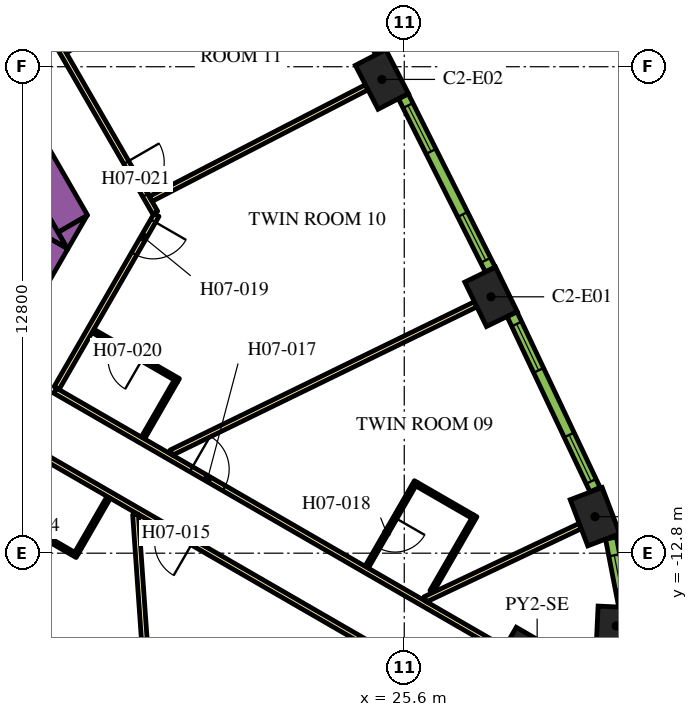
"""IFC4 building model, lengths in metres.
Left out: names, types, materials, properties, quantities, classifications, styles, units other than length and angle.
Written with IfcOpenShell. Run it as: python <this file> out.ifc"""

import sys

from ifc_helpers import new_model, si_unit, direction, frame, frame_2d, origin, origin_2d, place, context, subcontext, project, spatial, polyline, rectangle, outline, extrude, element, fill, save


model = new_model("IFC4")
c1 = context("Model", 3, precision=1e-05, world=origin(), true_north=direction((0.0, 1.0)))
c2 = subcontext(c1, "Body", "Model", "MODEL_VIEW")
j1 = project(units=[si_unit("LENGTHUNIT", "METRE"), si_unit("PLANEANGLEUNIT", "RADIAN")], contexts=[c1])
p1 = place(None, origin())
s1 = spatial("IfcSite", under=j1, at=p1, CompositionType="ELEMENT")
p2 = place(p1, origin())
s2 = spatial("IfcBuilding", under=s1, at=p2, CompositionType="ELEMENT")
p3 = place(p2, frame((0.0, 0.0, 99.3)))
s3 = spatial("IfcBuildingStorey", under=s2, at=p3, CompositionType="ELEMENT", Elevation=99.3)
p4 = place(p3, frame((29.097, -16.799, 0.0), z_axis=(0.0, 0.0, 1.0), x_axis=(0.866025403784, -0.5, 0.0)))
e1 = element("IfcColumn", 1, at=p4, inside=s3, PredefinedType="COLUMN", context=c2, shape_type="SweptSolid", body=[
    extrude(rectangle(XDim=3.0, YDim=3.0, at=origin_2d()), origin(), (0.0, 0.0, 1.0), 3.9),
])
p5 = place(p3, frame((31.177, -14.714, 0.0), z_axis=(0.0, 0.0, 1.0), x_axis=(0.046756026083, 0.998906338965, 0.0)))
e2 = element("IfcColumn", 2, at=p5, inside=s3, PredefinedType="COLUMN", context=c2, shape_type="SweptSolid", body=[
    extrude(rectangle(XDim=1.0, YDim=1.0, at=origin_2d()), origin(), (0.0, 0.0, 1.0), 3.9),
])
for number, where, z_axis, x_axis in (
    (3, (30.619, -11.839, 0.0), (0.0, 0.0, 1.0), (-0.355, 0.935, 0.0)),
    (4, (27.883, -6.054, 0.0), (0.0, 0.0, 1.0), (-0.438, 0.899, 0.0)),
    (5, (25.012, -0.334, 0.0), (0.0, 0.0, 1.0), (-0.459, 0.888, 0.0)),
):
    element("IfcColumn", number, at=place(p3, frame(where, z_axis=z_axis, x_axis=x_axis)), inside=s3, PredefinedType="COLUMN", context=c2, shape_type="SweptSolid", body=[
        extrude(rectangle(XDim=1.3, YDim=0.9, at=origin_2d()), origin(), (0.0, 0.0, 1.0), 3.9),
    ])
p6 = place(p3, frame((6.776, 13.364, 0.0), z_axis=(0.0, 0.0, 1.0), x_axis=(0.500004177138, -0.8660229921, 0.0)))
e6 = element("IfcWall", 6, at=p6, inside=s3, PredefinedType="SOLIDWALL", context=c2, shape_type="SweptSolid", body=[
    extrude(rectangle(XDim=20.204, YDim=0.9, at=frame_2d((10.102, 0.0))), origin(), (0.0, 0.0, 1.0), 3.9),
])
p7 = place(p3, origin())
e7 = element("IfcWall", 7, at=p7, inside=s3, PredefinedType="SOLIDWALL", context=c2, shape_type="SweptSolid", body=[
    extrude(outline(polyline([(16.743, -4.8), (16.489, -4.36), (17.251, -3.92), (16.743, -4.8)])), origin(), (0.0, 0.0, 1.0), 3.9),
])
p8 = place(p3, frame((11.695, -12.644, 0.0), z_axis=(0.0, 0.0, 1.0), x_axis=(0.500010229568, 0.86601949766, 0.0)))
e8 = element("IfcWall", 8, at=p8, inside=s3, PredefinedType="SOLIDWALL", context=c2, shape_type="SweptSolid", body=[
    extrude(rectangle(XDim=9.326, YDim=0.9, at=frame_2d((4.663, 0.0))), origin(), (0.0, 0.0, 1.0), 3.9),
])
e9 = element("IfcWall", 9, at=p7, inside=s3, PredefinedType="SOLIDWALL", context=c2, shape_type="SweptSolid", body=[
    extrude(outline(polyline([(16.223, -3.9), (16.732, -4.78), (15.969, -4.34), (16.223, -3.9)])), origin(), (0.0, 0.0, 1.0), 3.9),
])
p9 = place(p3, frame((16.412, -8.523, 0.0), z_axis=(0.0, 0.0, 1.0), x_axis=(0.866025629663, -0.499999608766, 0.0)))
e10 = element("IfcWall", 10, at=p9, inside=s3, PredefinedType="PARTITIONING", context=c2, shape_type="SweptSolid", body=[
    extrude(rectangle(XDim=13.624, YDim=0.15, at=frame_2d((6.812, 0.0))), origin(), (0.0, 0.0, 1.0), 2.75),
])
p10 = place(p9, frame((4.134, 0.0, 0.0)))
e11 = element("IfcOpeningElement", 11, at=p10, cuts=e10, PredefinedType="OPENING", context=c2, shape_type="SweptSolid", body=[
    extrude(rectangle(XDim=1.0, YDim=2.1, at=frame_2d((0.5, 1.05))), frame((0.0, 0.085, 0.0), z_axis=(0.0, -1.0, 0.0), x_axis=(1.0, 0.0, 0.0)), (0.0, 0.0, 1.0), 0.17),
])
p11 = place(p3, frame((19.081, -3.9, 0.0), z_axis=(0.0, 0.0, 1.0), x_axis=(-0.499974327079, -0.866040225545, 0.0)))
e12 = element("IfcWall", 12, at=p11, inside=s3, PredefinedType="PARTITIONING", context=c2, shape_type="SweptSolid", body=[
    extrude(rectangle(XDim=5.258, YDim=0.15, at=frame_2d((2.629, 0.0))), origin(), (0.0, 0.0, 1.0), 2.75),
])
p12 = place(p11, frame((0.18, 0.0, 0.0)))
e13 = element("IfcOpeningElement", 13, at=p12, cuts=e12, PredefinedType="OPENING", context=c2, shape_type="SweptSolid", body=[
    extrude(rectangle(XDim=1.0, YDim=2.1, at=frame_2d((0.5, 1.05))), frame((0.0, 0.085, 0.0), z_axis=(0.0, -1.0, 0.0), x_axis=(1.0, 0.0, 0.0)), (0.0, 0.0, 1.0), 0.17),
])
p13 = place(p3, frame((6.163, 18.475, 0.0), z_axis=(0.0, 0.0, 1.0), x_axis=(0.500001317485, -0.866024643133, 0.0)))
e14 = element("IfcWall", 14, at=p13, inside=s3, PredefinedType="PARTITIONING", context=c2, shape_type="SweptSolid", body=[
    extrude(rectangle(XDim=25.767, YDim=0.15, at=frame_2d((12.883, 0.0))), origin(), (0.0, 0.0, 1.0), 2.75),
])
p14 = place(p13, frame((24.241, 0.0, 0.0)))
e15 = element("IfcOpeningElement", 15, at=p14, cuts=e14, PredefinedType="OPENING", context=c2, shape_type="SweptSolid", body=[
    extrude(rectangle(XDim=1.0, YDim=2.1, at=frame_2d((0.5, 1.05))), frame((0.0, 0.085, 0.0), z_axis=(0.0, -1.0, 0.0), x_axis=(1.0, 0.0, 0.0)), (0.0, 0.0, 1.0), 0.17),
])
p15 = place(p13, frame((13.144, 0.0, 0.0)))
e16 = element("IfcOpeningElement", 16, at=p15, cuts=e14, PredefinedType="OPENING", context=c2, shape_type="SweptSolid", body=[
    extrude(rectangle(XDim=1.0, YDim=2.1, at=frame_2d((0.5, 1.05))), frame((0.0, 0.085, 0.0), z_axis=(0.0, -1.0, 0.0), x_axis=(1.0, 0.0, 0.0)), (0.0, 0.0, 1.0), 0.17),
])
p16 = place(p13, frame((11.592, 0.0, 0.0)))
e17 = element("IfcOpeningElement", 17, at=p16, cuts=e14, PredefinedType="OPENING", context=c2, shape_type="SweptSolid", body=[
    extrude(rectangle(XDim=1.1, YDim=2.1, at=frame_2d((0.55, 1.05))), frame((0.0, 0.085, 0.0), z_axis=(0.0, -1.0, 0.0), x_axis=(1.0, 0.0, 0.0)), (0.0, 0.0, 1.0), 0.17),
])
p17 = place(p13, frame((4.674, 0.0, 0.0)))
e18 = element("IfcOpeningElement", 18, at=p17, cuts=e14, PredefinedType="OPENING", context=c2, shape_type="SweptSolid", body=[
    extrude(rectangle(XDim=0.9, YDim=2.1, at=frame_2d((0.45, 1.05))), frame((0.0, 0.085, 0.0), z_axis=(0.0, -1.0, 0.0), x_axis=(1.0, 0.0, 0.0)), (0.0, 0.0, 1.0), 0.17),
])
p18 = place(p13, frame((2.411, 0.0, 0.0)))
e19 = element("IfcOpeningElement", 19, at=p18, cuts=e14, PredefinedType="OPENING", context=c2, shape_type="SweptSolid", body=[
    extrude(rectangle(XDim=1.0, YDim=2.1, at=frame_2d((0.5, 1.05))), frame((0.0, 0.085, 0.0), z_axis=(0.0, -1.0, 0.0), x_axis=(1.0, 0.0, 0.0)), (0.0, 0.0, 1.0), 0.17),
])
p19 = place(p3, frame((27.386, -16.764, 0.0), z_axis=(0.0, 0.0, 1.0), x_axis=(-0.866022585856, 0.500004880763, 0.0)))
e20 = element("IfcWall", 20, at=p19, inside=s3, PredefinedType="PARTITIONING", context=c2, shape_type="SweptSolid", body=[
    extrude(rectangle(XDim=13.544, YDim=0.15, at=frame_2d((6.772, 0.0))), origin(), (0.0, 0.0, 1.0), 2.75),
])
p20 = place(p19, frame((8.491, 0.0, 0.0)))
e21 = element("IfcOpeningElement", 21, at=p20, cuts=e20, PredefinedType="OPENING", context=c2, shape_type="SweptSolid", body=[
    extrude(rectangle(XDim=1.0, YDim=2.1, at=frame_2d((0.5, 1.05))), frame((0.0, 0.085, 0.0), z_axis=(0.0, -1.0, 0.0), x_axis=(1.0, 0.0, 0.0)), (0.0, 0.0, 1.0), 0.17),
])
p21 = place(p3, frame((19.153, -20.671, 0.0), z_axis=(0.0, 0.0, 1.0), x_axis=(-0.070070736723, 0.997542025107, 0.0)))
e22 = element("IfcWall", 22, at=p21, inside=s3, PredefinedType="PARTITIONING", context=c2, shape_type="SweptSolid", body=[
    extrude(rectangle(XDim=8.909, YDim=0.15, at=frame_2d((4.455, 0.0))), origin(), (0.0, 0.0, 1.0), 2.75),
])
p22 = place(p3, frame((24.613, -0.541, 0.0), z_axis=(0.0, 0.0, 1.0), x_axis=(-0.888459912519, -0.458954228487, 0.0)))
e23 = element("IfcWall", 23, at=p22, inside=s3, PredefinedType="PARTITIONING", context=c2, shape_type="SweptSolid", body=[
    extrude(rectangle(XDim=6.392, YDim=0.15, at=frame_2d((3.196, 0.0))), origin(), (0.0, 0.0, 1.0), 2.75),
])
p23 = place(p3, frame((27.479, -6.251, 0.0), z_axis=(0.0, 0.0, 1.0), x_axis=(-0.898945877276, -0.438059710231, 0.0)))
e24 = element("IfcWall", 24, at=p23, inside=s3, PredefinedType="PARTITIONING", context=c2, shape_type="SweptSolid", body=[
    extrude(rectangle(XDim=8.909, YDim=0.15, at=frame_2d((4.455, 0.0))), origin(), (0.0, 0.0, 1.0), 2.75),
])
p24 = place(p3, frame((30.231, -12.085, 0.0), z_axis=(0.0, 0.0, 1.0), x_axis=(-0.904001132572, -0.427530060122, 0.0)))
e25 = element("IfcWall", 25, at=p24, inside=s3, PredefinedType="PARTITIONING", context=c2, shape_type="SweptSolid", body=[
    extrude(rectangle(XDim=4.51, YDim=0.15, at=frame_2d((2.255, 0.0))), origin(), (0.0, 0.0, 1.0), 2.75),
])
p25 = place(p3, frame((14.74, -11.57, 0.0), z_axis=(0.0, 0.0, 1.0), x_axis=(0.866021400173, -0.500006934395, 0.0)))
e26 = element("IfcWall", 26, at=p25, inside=s3, PredefinedType="PARTITIONING", context=c2, shape_type="SweptSolid", body=[
    extrude(rectangle(XDim=2.6, YDim=0.1, at=frame_2d((1.3, 0.0))), origin(), (0.0, 0.0, 1.0), 2.75),
])
p26 = place(p25, frame((0.6, 0.0, 0.0)))
e27 = element("IfcOpeningElement", 27, at=p26, cuts=e26, PredefinedType="OPENING", context=c2, shape_type="SweptSolid", body=[
    extrude(rectangle(XDim=0.9, YDim=2.1, at=frame_2d((0.45, 1.05))), frame((0.0, 0.06, 0.0), z_axis=(0.0, -1.0, 0.0), x_axis=(1.0, 0.0, 0.0)), (0.0, 0.0, 1.0), 0.12),
])
p27 = place(p3, frame((16.978, -12.793, 0.0), z_axis=(0.0, 0.0, 1.0), x_axis=(0.500147619332, 0.865940158947, 0.0)))
e28 = element("IfcWall", 28, at=p27, inside=s3, PredefinedType="PARTITIONING", context=c2, shape_type="SweptSolid", body=[
    extrude(rectangle(XDim=1.69, YDim=0.1, at=frame_2d((0.845, 0.0))), origin(), (0.0, 0.0, 1.0), 2.75),
])
p28 = place(p3, frame((25.91, -10.918, 0.0), z_axis=(0.0, 0.0, 1.0), x_axis=(-0.500006934395, -0.866021400173, 0.0)))
e29 = element("IfcWall", 29, at=p28, inside=s3, PredefinedType="PARTITIONING", context=c2, shape_type="SweptSolid", body=[
    extrude(rectangle(XDim=2.6, YDim=0.1, at=frame_2d((1.3, 0.0))), origin(), (0.0, 0.0, 1.0), 2.75),
])
p29 = place(p28, frame((1.1, 0.0, 0.0)))
e30 = element("IfcOpeningElement", 30, at=p29, cuts=e29, PredefinedType="OPENING", context=c2, shape_type="SweptSolid", body=[
    extrude(rectangle(XDim=0.9, YDim=2.1, at=frame_2d((0.45, 1.05))), frame((0.0, 0.06, 0.0), z_axis=(0.0, -1.0, 0.0), x_axis=(1.0, 0.0, 0.0)), (0.0, 0.0, 1.0), 0.12),
])
p30 = place(p3, frame((25.928, -10.986, 0.0), z_axis=(0.0, 0.0, 1.0), x_axis=(0.866025371046, -0.500000056704, 0.0)))
e31 = element("IfcWall", 31, at=p30, inside=s3, PredefinedType="PARTITIONING", context=c2, shape_type="SweptSolid", body=[
    extrude(rectangle(XDim=1.7, YDim=0.1, at=frame_2d((0.85, 0.0))), origin(), (0.0, 0.0, 1.0), 2.75),
])
p31 = place(p3, frame((26.319, -13.81, 0.0), z_axis=(0.0, 0.0, 1.0), x_axis=(0.499952165731, 0.866053019151, 0.0)))
e32 = element("IfcWall", 32, at=p31, inside=s3, PredefinedType="PARTITIONING", context=c2, shape_type="SweptSolid", body=[
    extrude(rectangle(XDim=2.3, YDim=0.1, at=frame_2d((1.15, 0.0))), origin(), (0.0, 0.0, 1.0), 2.75),
])
p32 = place(p3, frame((19.659, -8.25, 0.0), z_axis=(0.0, 0.0, 1.0), x_axis=(-0.866021400173, 0.500006934395, 0.0)))
e33 = element("IfcWall", 33, at=p32, inside=s3, PredefinedType="PARTITIONING", context=c2, shape_type="SweptSolid", body=[
    extrude(rectangle(XDim=2.6, YDim=0.1, at=frame_2d((1.3, 0.0))), origin(), (0.0, 0.0, 1.0), 2.75),
])
p33 = place(p32, frame((1.1, 0.0, 0.0)))
e34 = element("IfcOpeningElement", 34, at=p33, cuts=e33, PredefinedType="OPENING", context=c2, shape_type="SweptSolid", body=[
    extrude(rectangle(XDim=0.9, YDim=2.1, at=frame_2d((0.45, 1.05))), frame((0.0, 0.06, 0.0), z_axis=(0.0, -1.0, 0.0), x_axis=(1.0, 0.0, 0.0)), (0.0, 0.0, 1.0), 0.12),
])
p34 = place(p3, frame((19.591, -8.268, 0.0), z_axis=(0.0, 0.0, 1.0), x_axis=(-0.500040090343, -0.866002256377, 0.0)))
e35 = element("IfcWall", 35, at=p34, inside=s3, PredefinedType="PARTITIONING", context=c2, shape_type="SweptSolid", body=[
    extrude(rectangle(XDim=1.73, YDim=0.1, at=frame_2d((0.865, 0.0))), origin(), (0.0, 0.0, 1.0), 2.75),
])
p35 = place(p3, frame((16.681, 0.407, 0.0), z_axis=(0.0, 0.0, 1.0), x_axis=(0.866021400173, 0.500006934395, 0.0)))
e36 = element("IfcWall", 36, at=p35, inside=s3, PredefinedType="PARTITIONING", context=c2, shape_type="SweptSolid", body=[
    extrude(rectangle(XDim=2.6, YDim=0.1, at=frame_2d((1.3, 0.0))), origin(), (0.0, 0.0, 1.0), 2.75),
])
p36 = place(p35, frame((0.6, 0.0, 0.0)))
e37 = element("IfcOpeningElement", 37, at=p36, cuts=e36, PredefinedType="OPENING", context=c2, shape_type="SweptSolid", body=[
    extrude(rectangle(XDim=0.9, YDim=2.1, at=frame_2d((0.45, 1.05))), frame((0.0, 0.06, 0.0), z_axis=(0.0, -1.0, 0.0), x_axis=(1.0, 0.0, 0.0)), (0.0, 0.0, 1.0), 0.12),
])
p37 = place(p3, frame((31.385, -14.189, 0.0), z_axis=(0.0, 0.0, 1.0), x_axis=(-0.190409913989, 0.981704672829, 0.0)))
e38 = element("IfcWall", 38, at=p37, inside=s3, PredefinedType="SOLIDWALL", context=c2, shape_type="SweptSolid", body=[
    extrude(rectangle(XDim=1.819, YDim=0.29, at=frame_2d((0.91, 0.0))), origin(), (0.0, 0.0, 1.0), 3.65),
])
p38 = place(p37, frame((0.46, 0.0, 0.9)))
e39 = element("IfcOpeningElement", 39, at=p38, cuts=e38, PredefinedType="OPENING", context=c2, shape_type="SweptSolid", body=[
    extrude(rectangle(XDim=0.9, YDim=2.15, at=frame_2d((0.45, 1.075))), frame((0.0, 0.155, 0.0), z_axis=(0.0, -1.0, 0.0), x_axis=(1.0, 0.0, 0.0)), (0.0, 0.0, 1.0), 0.31),
])
p39 = place(p3, frame((30.62, -11.127, 0.0), z_axis=(0.0, 0.0, 1.0), x_axis=(-0.427543726596, 0.903994669148, 0.0)))
e40 = element("IfcWall", 40, at=p39, inside=s3, PredefinedType="SOLIDWALL", context=c2, shape_type="SweptSolid", body=[
    extrude(rectangle(XDim=5.107, YDim=0.29, at=frame_2d((2.553, 0.0))), origin(), (0.0, 0.0, 1.0), 3.65),
])
p40 = place(p39, frame((0.24, 0.0, 0.9)))
e41 = element("IfcOpeningElement", 41, at=p40, cuts=e40, PredefinedType="OPENING", context=c2, shape_type="SweptSolid", body=[
    extrude(rectangle(XDim=1.35, YDim=2.15, at=frame_2d((0.675, 1.075))), frame((0.0, 0.155, 0.0), z_axis=(0.0, -1.0, 0.0), x_axis=(1.0, 0.0, 0.0)), (0.0, 0.0, 1.0), 0.31),
])
p41 = place(p39, frame((3.471, 0.0, 0.9)))
e42 = element("IfcOpeningElement", 42, at=p41, cuts=e40, PredefinedType="OPENING", context=c2, shape_type="SweptSolid", body=[
    extrude(rectangle(XDim=1.35, YDim=2.15, at=frame_2d((0.675, 1.075))), frame((0.0, 0.155, 0.0), z_axis=(0.0, -1.0, 0.0), x_axis=(1.0, 0.0, 0.0)), (0.0, 0.0, 1.0), 0.31),
])
p42 = place(p3, frame((27.864, -5.336, 0.0), z_axis=(0.0, 0.0, 1.0), x_axis=(-0.448534297211, 0.893765620409, 0.0)))
e43 = element("IfcWall", 43, at=p42, inside=s3, PredefinedType="SOLIDWALL", context=c2, shape_type="SweptSolid", body=[
    extrude(rectangle(XDim=5.1, YDim=0.29, at=frame_2d((2.55, 0.0))), origin(), (0.0, 0.0, 1.0), 3.65),
])
p43 = place(p42, frame((0.272, 0.0, 0.9)))
e44 = element("IfcOpeningElement", 44, at=p43, cuts=e43, PredefinedType="OPENING", context=c2, shape_type="SweptSolid", body=[
    extrude(rectangle(XDim=1.35, YDim=2.15, at=frame_2d((0.675, 1.075))), frame((0.0, 0.155, 0.0), z_axis=(0.0, -1.0, 0.0), x_axis=(1.0, 0.0, 0.0)), (0.0, 0.0, 1.0), 0.31),
])
p44 = place(p42, frame((3.478, 0.0, 0.9)))
e45 = element("IfcOpeningElement", 45, at=p44, cuts=e43, PredefinedType="OPENING", context=c2, shape_type="SweptSolid", body=[
    extrude(rectangle(XDim=1.35, YDim=2.15, at=frame_2d((0.675, 1.075))), frame((0.0, 0.155, 0.0), z_axis=(0.0, -1.0, 0.0), x_axis=(1.0, 0.0, 0.0)), (0.0, 0.0, 1.0), 0.31),
])
p45 = place(p3, frame((24.977, 0.383, 0.0), z_axis=(0.0, 0.0, 1.0), x_axis=(-0.469323203119, 0.883026461106, 0.0)))
e46 = element("IfcWall", 46, at=p45, inside=s3, PredefinedType="SOLIDWALL", context=c2, shape_type="SweptSolid", body=[
    extrude(rectangle(XDim=5.101, YDim=0.29, at=frame_2d((2.55, 0.0))), origin(), (0.0, 0.0, 1.0), 3.65),
])
p46 = place(p45, frame((0.273, 0.0, 0.9)))
e47 = element("IfcOpeningElement", 47, at=p46, cuts=e46, PredefinedType="OPENING", context=c2, shape_type="SweptSolid", body=[
    extrude(rectangle(XDim=1.35, YDim=2.15, at=frame_2d((0.675, 1.075))), frame((0.0, 0.155, 0.0), z_axis=(0.0, -1.0, 0.0), x_axis=(1.0, 0.0, 0.0)), (0.0, 0.0, 1.0), 0.31),
])
p47 = place(p45, frame((3.478, 0.0, 0.9)))
e48 = element("IfcOpeningElement", 48, at=p47, cuts=e46, PredefinedType="OPENING", context=c2, shape_type="SweptSolid", body=[
    extrude(rectangle(XDim=1.35, YDim=2.15, at=frame_2d((0.675, 1.075))), frame((0.0, 0.155, 0.0), z_axis=(0.0, -1.0, 0.0), x_axis=(1.0, 0.0, 0.0)), (0.0, 0.0, 1.0), 0.31),
])
p48 = place(p20, origin())
e49 = element("IfcDoor", 49, at=p48, inside=s3, OperationType="SINGLE_SWING_RIGHT", PredefinedType="DOOR", context=c2, shape_type="SweptSolid", body=[
    extrude(rectangle(XDim=1.0, YDim=2.1, at=frame_2d((0.5, 1.05))), frame((0.0, 0.025, 0.0), z_axis=(0.0, -1.0, 0.0), x_axis=(1.0, 0.0, 0.0)), (0.0, 0.0, 1.0), 0.05),
])
fill(e21, e49)
p49 = place(p10, origin())
e50 = element("IfcDoor", 50, at=p49, inside=s3, OperationType="SINGLE_SWING_LEFT", PredefinedType="DOOR", context=c2, shape_type="SweptSolid", body=[
    extrude(rectangle(XDim=1.0, YDim=2.1, at=frame_2d((0.5, 1.05))), frame((0.0, 0.025, 0.0), z_axis=(0.0, -1.0, 0.0), x_axis=(1.0, 0.0, 0.0)), (0.0, 0.0, 1.0), 0.05),
])
fill(e11, e50)
p50 = place(p29, origin())
e51 = element("IfcDoor", 51, at=p50, inside=s3, OperationType="SINGLE_SWING_RIGHT", PredefinedType="DOOR", context=c2, shape_type="SweptSolid", body=[
    extrude(rectangle(XDim=0.9, YDim=2.1, at=frame_2d((0.45, 1.05))), frame((0.0, 0.025, 0.0), z_axis=(0.0, -1.0, 0.0), x_axis=(1.0, 0.0, 0.0)), (0.0, 0.0, 1.0), 0.05),
])
fill(e30, e51)
p51 = place(p12, origin())
e52 = element("IfcDoor", 52, at=p51, inside=s3, OperationType="SINGLE_SWING_LEFT", PredefinedType="DOOR", context=c2, shape_type="SweptSolid", body=[
    extrude(rectangle(XDim=1.0, YDim=2.1, at=frame_2d((0.5, 1.05))), frame((0.0, 0.025, 0.0), z_axis=(0.0, -1.0, 0.0), x_axis=(1.0, 0.0, 0.0)), (0.0, 0.0, 1.0), 0.05),
])
fill(e13, e52)
p52 = place(p33, origin())
e53 = element("IfcDoor", 53, at=p52, inside=s3, OperationType="SINGLE_SWING_LEFT", PredefinedType="DOOR", context=c2, shape_type="SweptSolid", body=[
    extrude(rectangle(XDim=0.9, YDim=2.1, at=frame_2d((0.45, 1.05))), frame((0.0, 0.025, 0.0), z_axis=(0.0, -1.0, 0.0), x_axis=(1.0, 0.0, 0.0)), (0.0, 0.0, 1.0), 0.05),
])
fill(e34, e53)
p53 = place(p14, origin())
e54 = element("IfcDoor", 54, at=p53, inside=s3, OperationType="SINGLE_SWING_RIGHT", PredefinedType="DOOR", context=c2, shape_type="SweptSolid", body=[
    extrude(rectangle(XDim=1.0, YDim=2.1, at=frame_2d((0.5, 1.05))), frame((0.0, 0.025, 0.0), z_axis=(0.0, -1.0, 0.0), x_axis=(1.0, 0.0, 0.0)), (0.0, 0.0, 1.0), 0.05),
])
fill(e15, e54)
p54 = place(p38, origin())
e55 = element("IfcWindow", 55, at=p54, inside=s3, PartitioningType="SINGLE_PANEL", PredefinedType="WINDOW", context=c2, shape_type="SweptSolid", body=[
    extrude(rectangle(XDim=0.9, YDim=2.15, at=frame_2d((0.45, 1.075))), frame((0.0, 0.015, 0.0), z_axis=(0.0, -1.0, 0.0), x_axis=(1.0, 0.0, 0.0)), (0.0, 0.0, 1.0), 0.06),
])
fill(e39, e55)
p55 = place(p40, origin())
e56 = element("IfcWindow", 56, at=p55, inside=s3, PartitioningType="DOUBLE_PANEL_VERTICAL", PredefinedType="WINDOW", context=c2, shape_type="SweptSolid", body=[
    extrude(rectangle(XDim=1.35, YDim=2.15, at=frame_2d((0.675, 1.075))), frame((0.0, 0.015, 0.0), z_axis=(0.0, -1.0, 0.0), x_axis=(1.0, 0.0, 0.0)), (0.0, 0.0, 1.0), 0.06),
])
fill(e41, e56)
p56 = place(p41, origin())
e57 = element("IfcWindow", 57, at=p56, inside=s3, PartitioningType="DOUBLE_PANEL_VERTICAL", PredefinedType="WINDOW", context=c2, shape_type="SweptSolid", body=[
    extrude(rectangle(XDim=1.35, YDim=2.15, at=frame_2d((0.675, 1.075))), frame((0.0, 0.015, 0.0), z_axis=(0.0, -1.0, 0.0), x_axis=(1.0, 0.0, 0.0)), (0.0, 0.0, 1.0), 0.06),
])
fill(e42, e57)
p57 = place(p43, origin())
e58 = element("IfcWindow", 58, at=p57, inside=s3, PartitioningType="DOUBLE_PANEL_VERTICAL", PredefinedType="WINDOW", context=c2, shape_type="SweptSolid", body=[
    extrude(rectangle(XDim=1.35, YDim=2.15, at=frame_2d((0.675, 1.075))), frame((0.0, 0.015, 0.0), z_axis=(0.0, -1.0, 0.0), x_axis=(1.0, 0.0, 0.0)), (0.0, 0.0, 1.0), 0.06),
])
fill(e44, e58)
p58 = place(p44, origin())
e59 = element("IfcWindow", 59, at=p58, inside=s3, PartitioningType="DOUBLE_PANEL_VERTICAL", PredefinedType="WINDOW", context=c2, shape_type="SweptSolid", body=[
    extrude(rectangle(XDim=1.35, YDim=2.15, at=frame_2d((0.675, 1.075))), frame((0.0, 0.015, 0.0), z_axis=(0.0, -1.0, 0.0), x_axis=(1.0, 0.0, 0.0)), (0.0, 0.0, 1.0), 0.06),
])
fill(e45, e59)
save(model, sys.argv[1])
